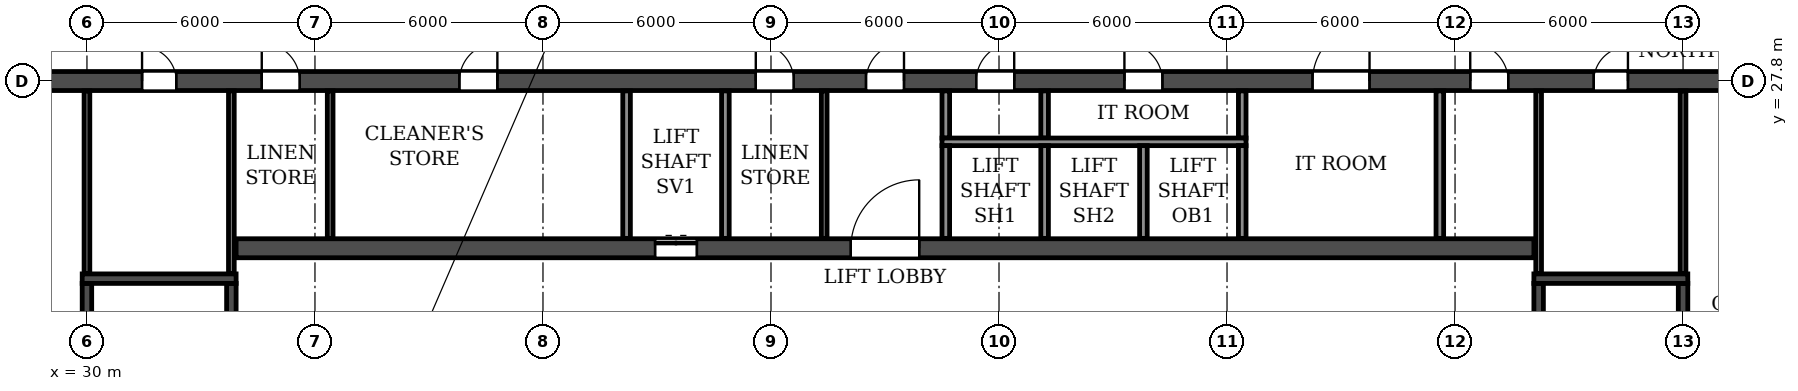
"""IFC4 building model, lengths in metres.
Left out: names, types, materials, properties, quantities, classifications, styles, units other than length and angle.
Written with IfcOpenShell. Run it as: python <this file> out.ifc"""

import sys

from ifc_helpers import new_model, si_unit, direction, frame, frame_2d, origin, place, context, subcontext, project, spatial, rectangle, extrude, element, fill, save


model = new_model("IFC4")
c1 = context("Model", 3, precision=1e-05, world=origin(), true_north=direction((0.0, 1.0)))
c2 = subcontext(c1, "Body", "Model", "MODEL_VIEW")
j1 = project(units=[si_unit("LENGTHUNIT", "METRE"), si_unit("PLANEANGLEUNIT", "RADIAN")], contexts=[c1])
p1 = place(None, origin())
s1 = spatial("IfcSite", under=j1, at=p1, CompositionType="ELEMENT")
p2 = place(p1, origin())
s2 = spatial("IfcBuilding", under=s1, at=p2, CompositionType="ELEMENT")
p3 = place(p2, frame((0.0, 0.0, 109.2)))
s3 = spatial("IfcBuildingStorey", under=s2, at=p3, CompositionType="ELEMENT", Elevation=109.2)
p4 = place(p3, frame((14.6, 27.8, 0.0), z_axis=(0.0, 0.0, 1.0), x_axis=(1.0, 0.0, 0.0)))
e1 = element("IfcWall", 1, at=p4, inside=s3, PredefinedType="SOLIDWALL", context=c2, shape_type="SweptSolid", body=[
    extrude(rectangle(XDim=72.8, YDim=0.5, at=frame_2d((36.4, 0.0))), origin(), (0.0, 0.0, 1.0), 3.06),
])
p5 = place(p4, frame((1.2, 0.0, 0.0)))
e2 = element("IfcOpeningElement", 2, at=p5, cuts=e1, PredefinedType="OPENING", context=c2, shape_type="SweptSolid", body=[
    extrude(rectangle(XDim=1.0, YDim=2.1, at=frame_2d((0.5, 1.05))), frame((0.0, 0.26, 0.0), z_axis=(0.0, -1.0, 0.0), x_axis=(1.0, 0.0, 0.0)), (0.0, 0.0, 1.0), 0.52),
])
p6 = place(p4, frame((4.3, 0.0, 0.0)))
e3 = element("IfcOpeningElement", 3, at=p6, cuts=e1, PredefinedType="OPENING", context=c2, shape_type="SweptSolid", body=[
    extrude(rectangle(XDim=1.0, YDim=2.1, at=frame_2d((0.5, 1.05))), frame((0.0, 0.26, 0.0), z_axis=(0.0, -1.0, 0.0), x_axis=(1.0, 0.0, 0.0)), (0.0, 0.0, 1.0), 0.52),
])
p7 = place(p4, frame((7.65, 0.0, 0.0)))
e4 = element("IfcOpeningElement", 4, at=p7, cuts=e1, PredefinedType="OPENING", context=c2, shape_type="SweptSolid", body=[
    extrude(rectangle(XDim=0.9, YDim=2.1, at=frame_2d((0.45, 1.05))), frame((0.0, 0.26, 0.0), z_axis=(0.0, -1.0, 0.0), x_axis=(1.0, 0.0, 0.0)), (0.0, 0.0, 1.0), 0.52),
])
p8 = place(p4, frame((16.85, 0.0, 0.0)))
e5 = element("IfcOpeningElement", 5, at=p8, cuts=e1, PredefinedType="OPENING", context=c2, shape_type="SweptSolid", body=[
    extrude(rectangle(XDim=0.9, YDim=2.1, at=frame_2d((0.45, 1.05))), frame((0.0, 0.26, 0.0), z_axis=(0.0, -1.0, 0.0), x_axis=(1.0, 0.0, 0.0)), (0.0, 0.0, 1.0), 0.52),
])
p9 = place(p4, frame((20.0, 0.0, 0.0)))
e6 = element("IfcOpeningElement", 6, at=p9, cuts=e1, PredefinedType="OPENING", context=c2, shape_type="SweptSolid", body=[
    extrude(rectangle(XDim=1.0, YDim=2.1, at=frame_2d((0.5, 1.05))), frame((0.0, 0.26, 0.0), z_axis=(0.0, -1.0, 0.0), x_axis=(1.0, 0.0, 0.0)), (0.0, 0.0, 1.0), 0.52),
])
p10 = place(p4, frame((25.2, 0.0, 0.0)))
e7 = element("IfcOpeningElement", 7, at=p10, cuts=e1, PredefinedType="OPENING", context=c2, shape_type="SweptSolid", body=[
    extrude(rectangle(XDim=1.0, YDim=2.1, at=frame_2d((0.5, 1.05))), frame((0.0, 0.26, 0.0), z_axis=(0.0, -1.0, 0.0), x_axis=(1.0, 0.0, 0.0)), (0.0, 0.0, 1.0), 0.52),
])
p11 = place(p4, frame((33.0, 0.0, 0.0)))
e8 = element("IfcOpeningElement", 8, at=p11, cuts=e1, PredefinedType="OPENING", context=c2, shape_type="SweptSolid", body=[
    extrude(rectangle(XDim=1.0, YDim=2.1, at=frame_2d((0.5, 1.05))), frame((0.0, 0.26, 0.0), z_axis=(0.0, -1.0, 0.0), x_axis=(1.0, 0.0, 0.0)), (0.0, 0.0, 1.0), 0.52),
])
p12 = place(p4, frame((35.9, 0.0, 0.0)))
e9 = element("IfcOpeningElement", 9, at=p12, cuts=e1, PredefinedType="OPENING", context=c2, shape_type="SweptSolid", body=[
    extrude(rectangle(XDim=1.0, YDim=2.1, at=frame_2d((0.5, 1.05))), frame((0.0, 0.26, 0.0), z_axis=(0.0, -1.0, 0.0), x_axis=(1.0, 0.0, 0.0)), (0.0, 0.0, 1.0), 0.52),
])
p13 = place(p4, frame((38.8, 0.0, 0.0)))
e10 = element("IfcOpeningElement", 10, at=p13, cuts=e1, PredefinedType="OPENING", context=c2, shape_type="SweptSolid", body=[
    extrude(rectangle(XDim=1.0, YDim=2.1, at=frame_2d((0.5, 1.05))), frame((0.0, 0.26, 0.0), z_axis=(0.0, -1.0, 0.0), x_axis=(1.0, 0.0, 0.0)), (0.0, 0.0, 1.0), 0.52),
])
p14 = place(p4, frame((42.7, 0.0, 0.0)))
e11 = element("IfcOpeningElement", 11, at=p14, cuts=e1, PredefinedType="OPENING", context=c2, shape_type="SweptSolid", body=[
    extrude(rectangle(XDim=1.0, YDim=2.1, at=frame_2d((0.5, 1.05))), frame((0.0, 0.26, 0.0), z_axis=(0.0, -1.0, 0.0), x_axis=(1.0, 0.0, 0.0)), (0.0, 0.0, 1.0), 0.52),
])
p15 = place(p4, frame((47.65, 0.0, 0.0)))
e12 = element("IfcOpeningElement", 12, at=p15, cuts=e1, PredefinedType="OPENING", context=c2, shape_type="SweptSolid", body=[
    extrude(rectangle(XDim=1.5, YDim=2.1, at=frame_2d((0.75, 1.05))), frame((0.0, 0.26, 0.0), z_axis=(0.0, -1.0, 0.0), x_axis=(1.0, 0.0, 0.0)), (0.0, 0.0, 1.0), 0.52),
])
p16 = place(p4, frame((51.8, 0.0, 0.0)))
e13 = element("IfcOpeningElement", 13, at=p16, cuts=e1, PredefinedType="OPENING", context=c2, shape_type="SweptSolid", body=[
    extrude(rectangle(XDim=1.0, YDim=2.1, at=frame_2d((0.5, 1.05))), frame((0.0, 0.26, 0.0), z_axis=(0.0, -1.0, 0.0), x_axis=(1.0, 0.0, 0.0)), (0.0, 0.0, 1.0), 0.52),
])
p17 = place(p4, frame((55.05, 0.0, 0.0)))
e14 = element("IfcOpeningElement", 14, at=p17, cuts=e1, PredefinedType="OPENING", context=c2, shape_type="SweptSolid", body=[
    extrude(rectangle(XDim=0.9, YDim=2.1, at=frame_2d((0.45, 1.05))), frame((0.0, 0.26, 0.0), z_axis=(0.0, -1.0, 0.0), x_axis=(1.0, 0.0, 0.0)), (0.0, 0.0, 1.0), 0.52),
])
p18 = place(p4, frame((64.25, 0.0, 0.0)))
e15 = element("IfcOpeningElement", 15, at=p18, cuts=e1, PredefinedType="OPENING", context=c2, shape_type="SweptSolid", body=[
    extrude(rectangle(XDim=0.9, YDim=2.1, at=frame_2d((0.45, 1.05))), frame((0.0, 0.26, 0.0), z_axis=(0.0, -1.0, 0.0), x_axis=(1.0, 0.0, 0.0)), (0.0, 0.0, 1.0), 0.52),
])
p19 = place(p4, frame((67.5, 0.0, 0.0)))
e16 = element("IfcOpeningElement", 16, at=p19, cuts=e1, PredefinedType="OPENING", context=c2, shape_type="SweptSolid", body=[
    extrude(rectangle(XDim=1.0, YDim=2.1, at=frame_2d((0.5, 1.05))), frame((0.0, 0.26, 0.0), z_axis=(0.0, -1.0, 0.0), x_axis=(1.0, 0.0, 0.0)), (0.0, 0.0, 1.0), 0.52),
])
p20 = place(p4, frame((70.6, 0.0, 0.0)))
e17 = element("IfcOpeningElement", 17, at=p20, cuts=e1, PredefinedType="OPENING", context=c2, shape_type="SweptSolid", body=[
    extrude(rectangle(XDim=1.0, YDim=2.1, at=frame_2d((0.5, 1.05))), frame((0.0, 0.26, 0.0), z_axis=(0.0, -1.0, 0.0), x_axis=(1.0, 0.0, 0.0)), (0.0, 0.0, 1.0), 0.52),
])
p21 = place(p3, frame((33.925, 23.4, 0.0), z_axis=(0.0, 0.0, 1.0), x_axis=(1.0, 0.0, 0.0)))
e18 = element("IfcWall", 18, at=p21, inside=s3, PredefinedType="SOLIDWALL", context=c2, shape_type="SweptSolid", body=[
    extrude(rectangle(XDim=34.15, YDim=0.5, at=frame_2d((17.075, 0.0))), origin(), (0.0, 0.0, 1.0), 3.06),
])
p22 = place(p21, frame((16.175, 0.0, 0.0)))
e19 = element("IfcOpeningElement", 19, at=p22, cuts=e18, PredefinedType="OPENING", context=c2, shape_type="SweptSolid", body=[
    extrude(rectangle(XDim=1.8, YDim=2.1, at=frame_2d((0.9, 1.05))), frame((0.0, 0.26, 0.0), z_axis=(0.0, -1.0, 0.0), x_axis=(1.0, 0.0, 0.0)), (0.0, 0.0, 1.0), 0.52),
])
p23 = place(p21, frame((11.025, 0.0, 0.0)))
e20 = element("IfcOpeningElement", 20, at=p23, cuts=e18, PredefinedType="OPENING", context=c2, shape_type="SweptSolid", body=[
    extrude(rectangle(XDim=1.1, YDim=2.1, at=frame_2d((0.55, 1.05))), frame((0.0, 0.26, 0.0), z_axis=(0.0, -1.0, 0.0), x_axis=(1.0, 0.0, 0.0)), (0.0, 0.0, 1.0), 0.52),
])
p24 = place(p3, frame((30.0, 14.85, 0.0), z_axis=(0.0, 0.0, 1.0), x_axis=(0.0, 1.0, 0.0)))
e21 = element("IfcWall", 21, at=p24, inside=s3, PredefinedType="SOLIDWALL", context=c2, shape_type="SweptSolid", body=[
    extrude(rectangle(XDim=7.625, YDim=0.25, at=frame_2d((3.812, 0.0))), origin(), (0.0, 0.0, 1.0), 3.06),
])
p25 = place(p3, frame((33.8, 14.85, 0.0), z_axis=(0.0, 0.0, 1.0), x_axis=(0.0, 1.0, 0.0)))
e22 = element("IfcWall", 22, at=p25, inside=s3, PredefinedType="SOLIDWALL", context=c2, shape_type="SweptSolid", body=[
    extrude(rectangle(XDim=7.625, YDim=0.25, at=frame_2d((3.812, 0.0))), origin(), (0.0, 0.0, 1.0), 3.06),
])
p26 = place(p25, frame((0.45, 0.0, 0.0)))
e23 = element("IfcOpeningElement", 23, at=p26, cuts=e22, PredefinedType="OPENING", context=c2, shape_type="SweptSolid", body=[
    extrude(rectangle(XDim=1.0, YDim=2.1, at=frame_2d((0.5, 1.05))), frame((0.0, 0.135, 0.0), z_axis=(0.0, -1.0, 0.0), x_axis=(1.0, 0.0, 0.0)), (0.0, 0.0, 1.0), 0.27),
])
p27 = place(p3, frame((29.875, 22.6, 0.0), z_axis=(0.0, 0.0, 1.0), x_axis=(1.0, 0.0, 0.0)))
e24 = element("IfcWall", 24, at=p27, inside=s3, PredefinedType="SOLIDWALL", context=c2, shape_type="SweptSolid", body=[
    extrude(rectangle(XDim=4.05, YDim=0.25, at=frame_2d((2.025, 0.0))), origin(), (0.0, 0.0, 1.0), 3.06),
])
p28 = place(p3, frame((68.2, 14.85, 0.0), z_axis=(0.0, 0.0, 1.0), x_axis=(0.0, 1.0, 0.0)))
e25 = element("IfcWall", 25, at=p28, inside=s3, PredefinedType="SOLIDWALL", context=c2, shape_type="SweptSolid", body=[
    extrude(rectangle(XDim=7.625, YDim=0.25, at=frame_2d((3.812, 0.0))), origin(), (0.0, 0.0, 1.0), 3.06),
])
p29 = place(p28, frame((0.45, 0.0, 0.0)))
e26 = element("IfcOpeningElement", 26, at=p29, cuts=e25, PredefinedType="OPENING", context=c2, shape_type="SweptSolid", body=[
    extrude(rectangle(XDim=1.0, YDim=2.1, at=frame_2d((0.5, 1.05))), frame((0.0, 0.135, 0.0), z_axis=(0.0, -1.0, 0.0), x_axis=(1.0, 0.0, 0.0)), (0.0, 0.0, 1.0), 0.27),
])
p30 = place(p3, frame((72.0, 14.85, 0.0), z_axis=(0.0, 0.0, 1.0), x_axis=(0.0, 1.0, 0.0)))
e27 = element("IfcWall", 27, at=p30, inside=s3, PredefinedType="SOLIDWALL", context=c2, shape_type="SweptSolid", body=[
    extrude(rectangle(XDim=7.625, YDim=0.25, at=frame_2d((3.812, 0.0))), origin(), (0.0, 0.0, 1.0), 3.06),
])
p31 = place(p3, frame((68.075, 22.6, 0.0), z_axis=(0.0, 0.0, 1.0), x_axis=(1.0, 0.0, 0.0)))
e28 = element("IfcWall", 28, at=p31, inside=s3, PredefinedType="SOLIDWALL", context=c2, shape_type="SweptSolid", body=[
    extrude(rectangle(XDim=4.05, YDim=0.25, at=frame_2d((2.025, 0.0))), origin(), (0.0, 0.0, 1.0), 3.06),
])
for number, where, z_axis, x_axis in (
    (29, (49.4, 23.66, 0.0), (0.0, 0.0, 1.0), (0.0, 1.0, 0.0)),
    (30, (36.4, 23.66, 0.0), (0.0, 0.0, 1.0), (0.0, 1.0, 0.0)),
):
    element("IfcWall", number, at=place(p3, frame(where, z_axis=z_axis, x_axis=x_axis)), inside=s3, PredefinedType="PARTITIONING", context=c2, shape_type="SweptSolid", body=[
        extrude(rectangle(XDim=3.88, YDim=0.15, at=frame_2d((1.94, 0.0))), origin(), (0.0, 0.0, 1.0), 3.06),
    ])
for number, where, z_axis, x_axis in (
    (31, (52.6, 26.3, 0.0), (0.0, 0.0, 1.0), (0.0, 1.0, 0.0)),
    (32, (55.2, 26.3, 0.0), (0.0, 0.0, 1.0), (0.0, 1.0, 0.0)),
    (33, (60.4, 26.3, 0.0), (0.0, 0.0, 1.0), (0.0, 1.0, 0.0)),
):
    element("IfcWall", number, at=place(p3, frame(where, z_axis=z_axis, x_axis=x_axis)), inside=s3, PredefinedType="PARTITIONING", context=c2, shape_type="SweptSolid", body=[
        extrude(rectangle(XDim=1.24, YDim=0.2, at=frame_2d((0.62, 0.0))), origin(), (0.0, 0.0, 1.0), 3.06),
    ])
p32 = place(p3, frame((65.6, 23.66, 0.0), z_axis=(0.0, 0.0, 1.0), x_axis=(0.0, 1.0, 0.0)))
e34 = element("IfcWall", 34, at=p32, inside=s3, PredefinedType="PARTITIONING", context=c2, shape_type="SweptSolid", body=[
    extrude(rectangle(XDim=3.88, YDim=0.2, at=frame_2d((1.94, 0.0))), origin(), (0.0, 0.0, 1.0), 3.06),
])
for number, where, z_axis, x_axis in (
    (35, (30.0, 22.735, 0.0), (0.0, 0.0, 1.0), (0.0, 1.0, 0.0)),
    (36, (33.8, 22.735, 0.0), (0.0, 0.0, 1.0), (0.0, 1.0, 0.0)),
    (37, (68.2, 22.735, 0.0), (0.0, 0.0, 1.0), (0.0, 1.0, 0.0)),
    (38, (72.0, 22.735, 0.0), (0.0, 0.0, 1.0), (0.0, 1.0, 0.0)),
):
    element("IfcWall", number, at=place(p3, frame(where, z_axis=z_axis, x_axis=x_axis)), inside=s3, PredefinedType="PARTITIONING", context=c2, shape_type="SweptSolid", body=[
        extrude(rectangle(XDim=4.805, YDim=0.15, at=frame_2d((2.402, 0.0))), origin(), (0.0, 0.0, 1.0), 3.06),
    ])
p33 = place(p3, frame((52.5, 26.2, 0.0), z_axis=(0.0, 0.0, 1.0), x_axis=(1.0, 0.0, 0.0)))
e39 = element("IfcWall", 39, at=p33, inside=s3, PredefinedType="PARTITIONING", context=c2, shape_type="SweptSolid", body=[
    extrude(rectangle(XDim=8.0, YDim=0.2, at=frame_2d((4.0, 0.0))), origin(), (0.0, 0.0, 1.0), 3.06),
])
for number, where, z_axis, x_axis in (
    (40, (44.2, 23.66, 0.0), (0.0, 0.0, 1.0), (0.0, 1.0, 0.0)),
    (41, (46.8, 23.66, 0.0), (0.0, 0.0, 1.0), (0.0, 1.0, 0.0)),
):
    element("IfcWall", number, at=place(p3, frame(where, z_axis=z_axis, x_axis=x_axis)), inside=s3, PredefinedType="PARTITIONING", context=c2, shape_type="SweptSolid", body=[
        extrude(rectangle(XDim=3.88, YDim=0.2, at=frame_2d((1.94, 0.0))), origin(), (0.0, 0.0, 1.0), 3.06),
    ])
for number, where, z_axis, x_axis in (
    (42, (52.6, 23.66, 0.0), (0.0, 0.0, 1.0), (0.0, 1.0, 0.0)),
    (43, (55.2, 23.66, 0.0), (0.0, 0.0, 1.0), (0.0, 1.0, 0.0)),
    (44, (57.8, 23.66, 0.0), (0.0, 0.0, 1.0), (0.0, 1.0, 0.0)),
    (45, (60.4, 23.66, 0.0), (0.0, 0.0, 1.0), (0.0, 1.0, 0.0)),
):
    element("IfcWall", number, at=place(p3, frame(where, z_axis=z_axis, x_axis=x_axis)), inside=s3, PredefinedType="PARTITIONING", context=c2, shape_type="SweptSolid", body=[
        extrude(rectangle(XDim=2.44, YDim=0.2, at=frame_2d((1.22, 0.0))), origin(), (0.0, 0.0, 1.0), 3.06),
    ])
p34 = place(p8, origin())
e46 = element("IfcDoor", 46, at=p34, inside=s3, OperationType="SINGLE_SWING_LEFT", PredefinedType="DOOR", context=c2, shape_type="SweptSolid", body=[
    extrude(rectangle(XDim=0.9, YDim=2.1, at=frame_2d((0.45, 1.05))), frame((0.0, 0.025, 0.0), z_axis=(0.0, -1.0, 0.0), x_axis=(1.0, 0.0, 0.0)), (0.0, 0.0, 1.0), 0.05),
])
fill(e5, e46)
p35 = place(p9, origin())
e47 = element("IfcDoor", 47, at=p35, inside=s3, OperationType="SINGLE_SWING_LEFT", PredefinedType="DOOR", context=c2, shape_type="SweptSolid", body=[
    extrude(rectangle(XDim=1.0, YDim=2.1, at=frame_2d((0.5, 1.05))), frame((0.0, 0.025, 0.0), z_axis=(0.0, -1.0, 0.0), x_axis=(1.0, 0.0, 0.0)), (0.0, 0.0, 1.0), 0.05),
])
fill(e6, e47)
p36 = place(p10, origin())
e48 = element("IfcDoor", 48, at=p36, inside=s3, OperationType="SINGLE_SWING_RIGHT", PredefinedType="DOOR", context=c2, shape_type="SweptSolid", body=[
    extrude(rectangle(XDim=1.0, YDim=2.1, at=frame_2d((0.5, 1.05))), frame((0.0, 0.025, 0.0), z_axis=(0.0, -1.0, 0.0), x_axis=(1.0, 0.0, 0.0)), (0.0, 0.0, 1.0), 0.05),
])
fill(e7, e48)
p37 = place(p11, origin())
e49 = element("IfcDoor", 49, at=p37, inside=s3, OperationType="SINGLE_SWING_LEFT", PredefinedType="DOOR", context=c2, shape_type="SweptSolid", body=[
    extrude(rectangle(XDim=1.0, YDim=2.1, at=frame_2d((0.5, 1.05))), frame((0.0, 0.025, 0.0), z_axis=(0.0, -1.0, 0.0), x_axis=(1.0, 0.0, 0.0)), (0.0, 0.0, 1.0), 0.05),
])
fill(e8, e49)
p38 = place(p12, origin())
e50 = element("IfcDoor", 50, at=p38, inside=s3, OperationType="SINGLE_SWING_RIGHT", PredefinedType="DOOR", context=c2, shape_type="SweptSolid", body=[
    extrude(rectangle(XDim=1.0, YDim=2.1, at=frame_2d((0.5, 1.05))), frame((0.0, 0.025, 0.0), z_axis=(0.0, -1.0, 0.0), x_axis=(1.0, 0.0, 0.0)), (0.0, 0.0, 1.0), 0.05),
])
fill(e9, e50)
p39 = place(p13, origin())
e51 = element("IfcDoor", 51, at=p39, inside=s3, OperationType="SINGLE_SWING_RIGHT", PredefinedType="DOOR", context=c2, shape_type="SweptSolid", body=[
    extrude(rectangle(XDim=1.0, YDim=2.1, at=frame_2d((0.5, 1.05))), frame((0.0, 0.025, 0.0), z_axis=(0.0, -1.0, 0.0), x_axis=(1.0, 0.0, 0.0)), (0.0, 0.0, 1.0), 0.05),
])
fill(e10, e51)
p40 = place(p14, origin())
e52 = element("IfcDoor", 52, at=p40, inside=s3, OperationType="SINGLE_SWING_LEFT", PredefinedType="DOOR", context=c2, shape_type="SweptSolid", body=[
    extrude(rectangle(XDim=1.0, YDim=2.1, at=frame_2d((0.5, 1.05))), frame((0.0, 0.025, 0.0), z_axis=(0.0, -1.0, 0.0), x_axis=(1.0, 0.0, 0.0)), (0.0, 0.0, 1.0), 0.05),
])
fill(e11, e52)
p41 = place(p15, origin())
e53 = element("IfcDoor", 53, at=p41, inside=s3, OperationType="DOUBLE_DOOR_SINGLE_SWING", PredefinedType="DOOR", context=c2, shape_type="SweptSolid", body=[
    extrude(rectangle(XDim=1.5, YDim=2.1, at=frame_2d((0.75, 1.05))), frame((0.0, 0.025, 0.0), z_axis=(0.0, -1.0, 0.0), x_axis=(1.0, 0.0, 0.0)), (0.0, 0.0, 1.0), 0.05),
])
fill(e12, e53)
p42 = place(p16, origin())
e54 = element("IfcDoor", 54, at=p42, inside=s3, OperationType="SINGLE_SWING_LEFT", PredefinedType="DOOR", context=c2, shape_type="SweptSolid", body=[
    extrude(rectangle(XDim=1.0, YDim=2.1, at=frame_2d((0.5, 1.05))), frame((0.0, 0.025, 0.0), z_axis=(0.0, -1.0, 0.0), x_axis=(1.0, 0.0, 0.0)), (0.0, 0.0, 1.0), 0.05),
])
fill(e13, e54)
p43 = place(p17, origin())
e55 = element("IfcDoor", 55, at=p43, inside=s3, OperationType="SINGLE_SWING_RIGHT", PredefinedType="DOOR", context=c2, shape_type="SweptSolid", body=[
    extrude(rectangle(XDim=0.9, YDim=2.1, at=frame_2d((0.45, 1.05))), frame((0.0, 0.025, 0.0), z_axis=(0.0, -1.0, 0.0), x_axis=(1.0, 0.0, 0.0)), (0.0, 0.0, 1.0), 0.05),
])
fill(e14, e55)
p44 = place(p22, origin())
e56 = element("IfcDoor", 56, at=p44, inside=s3, OperationType="DOUBLE_DOOR_SINGLE_SWING", PredefinedType="DOOR", context=c2, shape_type="SweptSolid", body=[
    extrude(rectangle(XDim=1.8, YDim=2.1, at=frame_2d((0.9, 1.05))), frame((0.0, 0.025, 0.0), z_axis=(0.0, -1.0, 0.0), x_axis=(1.0, 0.0, 0.0)), (0.0, 0.0, 1.0), 0.05),
])
fill(e19, e56)
p45 = place(p23, origin())
e57 = element("IfcDoor", 57, at=p45, inside=s3, OperationType="DOUBLE_DOOR_SLIDING", PredefinedType="DOOR", context=c2, shape_type="SweptSolid", body=[
    extrude(rectangle(XDim=1.1, YDim=2.1, at=frame_2d((0.55, 1.05))), frame((0.0, 0.025, 0.0), z_axis=(0.0, -1.0, 0.0), x_axis=(1.0, 0.0, 0.0)), (0.0, 0.0, 1.0), 0.05),
])
fill(e20, e57)
save(model, sys.argv[1])
